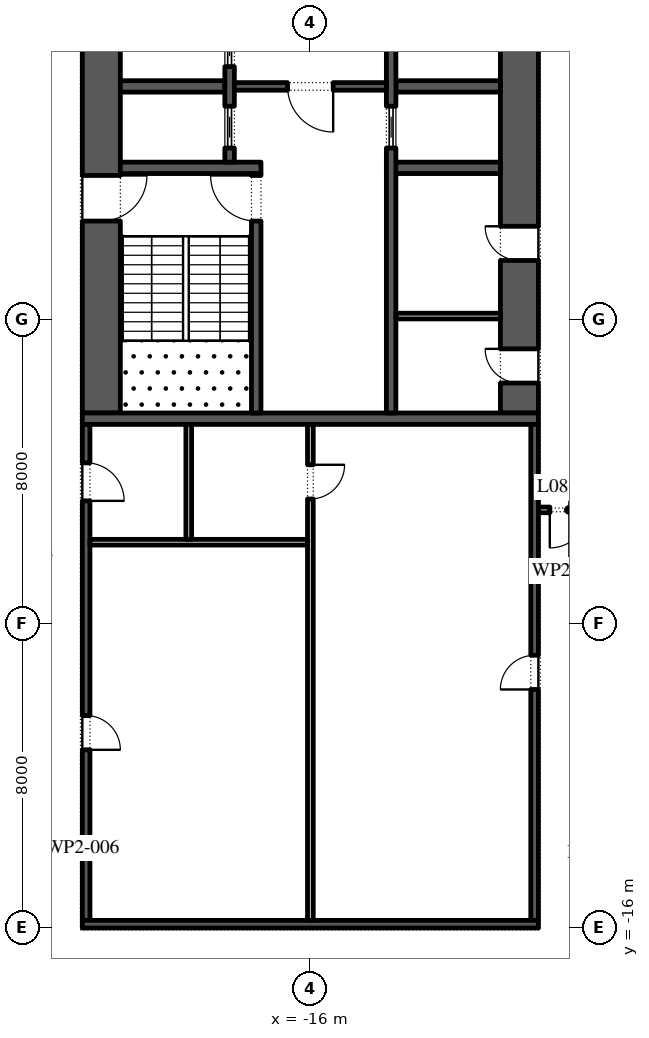
"""IFC4 building model, lengths in metres.
Left out: names, types, materials, properties, quantities, classifications, styles, units other than length and angle.
Written with IfcOpenShell. Run it as: python <this file> out.ifc"""

import sys

from ifc_helpers import new_model, si_unit, direction, frame, frame_2d, origin, place, context, subcontext, project, spatial, rectangle, extrude, element, fill, save


model = new_model("IFC4")
c1 = context("Model", 3, precision=1e-05, world=origin(), true_north=direction((0.0, 1.0)))
c2 = subcontext(c1, "Body", "Model", "MODEL_VIEW")
j1 = project(units=[si_unit("LENGTHUNIT", "METRE"), si_unit("PLANEANGLEUNIT", "RADIAN")], contexts=[c1])
p1 = place(None, origin())
s1 = spatial("IfcSite", under=j1, at=p1, CompositionType="ELEMENT")
p2 = place(p1, origin())
s2 = spatial("IfcBuilding", under=s1, at=p2, CompositionType="ELEMENT")
p3 = place(p2, frame((0.0, 0.0, 43.8)))
s3 = spatial("IfcBuildingStorey", under=s2, at=p3, CompositionType="ELEMENT", Elevation=43.8)
p4 = place(p3, frame((-21.5, -2.45, 0.0), z_axis=(0.0, 0.0, 1.0), x_axis=(0.0, 1.0, 0.0)))
e1 = element("IfcWall", 1, at=p4, inside=s3, PredefinedType="SHEAR", context=c2, shape_type="SweptSolid", body=[
    extrude(rectangle(XDim=27.9, YDim=1.0, at=frame_2d((13.95, 0.0))), origin(), (0.0, 0.0, 1.0), 4.0),
])
p5 = place(p4, frame((5.05, 0.0, 0.0)))
e2 = element("IfcOpeningElement", 2, at=p5, cuts=e1, PredefinedType="OPENING", context=c2, shape_type="SweptSolid", body=[
    extrude(rectangle(XDim=1.2, YDim=2.1, at=frame_2d((0.6, 1.05))), frame((0.0, 0.51, 0.0), z_axis=(0.0, -1.0, 0.0), x_axis=(1.0, 0.0, 0.0)), (0.0, 0.0, 1.0), 1.02),
])
p6 = place(p4, frame((21.65, 0.0, 0.0)))
e3 = element("IfcOpeningElement", 3, at=p6, cuts=e1, PredefinedType="OPENING", context=c2, shape_type="SweptSolid", body=[
    extrude(rectangle(XDim=1.2, YDim=2.1, at=frame_2d((0.6, 1.05))), frame((0.0, 0.51, 0.0), z_axis=(0.0, -1.0, 0.0), x_axis=(1.0, 0.0, 0.0)), (0.0, 0.0, 1.0), 1.02),
])
p7 = place(p3, frame((-10.5, -2.45, 0.0), z_axis=(0.0, 0.0, 1.0), x_axis=(0.0, 1.0, 0.0)))
e4 = element("IfcWall", 4, at=p7, inside=s3, PredefinedType="SHEAR", context=c2, shape_type="SweptSolid", body=[
    extrude(rectangle(XDim=27.9, YDim=1.0, at=frame_2d((13.95, 0.0))), origin(), (0.0, 0.0, 1.0), 4.0),
])
p8 = place(p7, frame((23.65, 0.0, 0.0)))
e5 = element("IfcOpeningElement", 5, at=p8, cuts=e4, PredefinedType="OPENING", context=c2, shape_type="SweptSolid", body=[
    extrude(rectangle(XDim=2.4, YDim=2.1, at=frame_2d((1.2, 1.05))), frame((0.0, 0.51, 0.0), z_axis=(0.0, -1.0, 0.0), x_axis=(1.0, 0.0, 0.0)), (0.0, 0.0, 1.0), 1.02),
])
p9 = place(p7, frame((0.788, 0.0, 0.0)))
e6 = element("IfcOpeningElement", 6, at=p9, cuts=e4, PredefinedType="OPENING", context=c2, shape_type="SweptSolid", body=[
    extrude(rectangle(XDim=0.9, YDim=2.1, at=frame_2d((0.45, 1.05))), frame((0.0, 0.51, 0.0), z_axis=(0.0, -1.0, 0.0), x_axis=(1.0, 0.0, 0.0)), (0.0, 0.0, 1.0), 1.02),
])
p10 = place(p7, frame((4.012, 0.0, 0.0)))
e7 = element("IfcOpeningElement", 7, at=p10, cuts=e4, PredefinedType="OPENING", context=c2, shape_type="SweptSolid", body=[
    extrude(rectangle(XDim=0.9, YDim=2.1, at=frame_2d((0.45, 1.05))), frame((0.0, 0.51, 0.0), z_axis=(0.0, -1.0, 0.0), x_axis=(1.0, 0.0, 0.0)), (0.0, 0.0, 1.0), 1.02),
])
p11 = place(p3, frame((-22.0, -2.6, 0.0), z_axis=(0.0, 0.0, 1.0), x_axis=(1.0, 0.0, 0.0)))
e8 = element("IfcWall", 8, at=p11, inside=s3, PredefinedType="SHEAR", context=c2, shape_type="SweptSolid", body=[
    extrude(rectangle(XDim=12.0, YDim=0.3, at=frame_2d((6.0, 0.0))), origin(), (0.0, 0.0, 1.0), 4.0),
])
p12 = place(p3, frame((-21.0, 4.0, 0.0), z_axis=(0.0, 0.0, 1.0), x_axis=(1.0, 0.0, 0.0)))
e9 = element("IfcWall", 9, at=p12, inside=s3, PredefinedType="SHEAR", context=c2, shape_type="SweptSolid", body=[
    extrude(rectangle(XDim=3.7, YDim=0.3, at=frame_2d((1.85, 0.0))), origin(), (0.0, 0.0, 1.0), 4.0),
])
p13 = place(p3, frame((-17.425, -2.45, 0.0), z_axis=(0.0, 0.0, 1.0), x_axis=(0.0, 1.0, 0.0)))
e10 = element("IfcWall", 10, at=p13, inside=s3, PredefinedType="SHEAR", context=c2, shape_type="SweptSolid", body=[
    extrude(rectangle(XDim=6.3, YDim=0.25, at=frame_2d((3.15, 0.0))), origin(), (0.0, 0.0, 1.0), 4.0),
])
p14 = place(p13, frame((5.05, 0.0, 0.0)))
e11 = element("IfcOpeningElement", 11, at=p14, cuts=e10, PredefinedType="OPENING", context=c2, shape_type="SweptSolid", body=[
    extrude(rectangle(XDim=1.2, YDim=2.1, at=frame_2d((0.6, 1.05))), frame((0.0, 0.135, 0.0), z_axis=(0.0, -1.0, 0.0), x_axis=(1.0, 0.0, 0.0)), (0.0, 0.0, 1.0), 0.27),
])
p15 = place(p3, frame((-21.0, 6.143, 0.0), z_axis=(0.0, 0.0, 1.0), x_axis=(1.0, 0.0, 0.0)))
e12 = element("IfcWall", 12, at=p15, inside=s3, PredefinedType="SHEAR", context=c2, shape_type="SweptSolid", body=[
    extrude(rectangle(XDim=2.75, YDim=0.3, at=frame_2d((1.375, 0.0))), origin(), (0.0, 0.0, 1.0), 4.0),
])
p16 = place(p3, frame((-18.125, 4.15, 0.0), z_axis=(0.0, 0.0, 1.0), x_axis=(0.0, 1.0, 0.0)))
e13 = element("IfcWall", 13, at=p16, inside=s3, PredefinedType="SHEAR", context=c2, shape_type="SweptSolid", body=[
    extrude(rectangle(XDim=14.7, YDim=0.25, at=frame_2d((7.35, 0.0))), origin(), (0.0, 0.0, 1.0), 4.0),
])
p17 = place(p16, frame((0.371, 0.0, 0.0)))
e14 = element("IfcOpeningElement", 14, at=p17, cuts=e13, PredefinedType="OPENING", context=c2, shape_type="SweptSolid", body=[
    extrude(rectangle(XDim=1.1, YDim=2.1, at=frame_2d((0.55, 1.05))), frame((0.0, 0.135, 0.0), z_axis=(0.0, -1.0, 0.0), x_axis=(1.0, 0.0, 0.0)), (0.0, 0.0, 1.0), 0.27),
])
p18 = place(p16, frame((2.514, 0.0, 0.0)))
e15 = element("IfcOpeningElement", 15, at=p18, cuts=e13, PredefinedType="OPENING", context=c2, shape_type="SweptSolid", body=[
    extrude(rectangle(XDim=1.1, YDim=2.1, at=frame_2d((0.55, 1.05))), frame((0.0, 0.135, 0.0), z_axis=(0.0, -1.0, 0.0), x_axis=(1.0, 0.0, 0.0)), (0.0, 0.0, 1.0), 0.27),
])
p19 = place(p16, frame((4.657, 0.0, 0.0)))
e16 = element("IfcOpeningElement", 16, at=p19, cuts=e13, PredefinedType="OPENING", context=c2, shape_type="SweptSolid", body=[
    extrude(rectangle(XDim=1.1, YDim=2.1, at=frame_2d((0.55, 1.05))), frame((0.0, 0.135, 0.0), z_axis=(0.0, -1.0, 0.0), x_axis=(1.0, 0.0, 0.0)), (0.0, 0.0, 1.0), 0.27),
])
p20 = place(p16, frame((6.8, 0.0, 0.0)))
e17 = element("IfcOpeningElement", 17, at=p20, cuts=e13, PredefinedType="OPENING", context=c2, shape_type="SweptSolid", body=[
    extrude(rectangle(XDim=1.1, YDim=2.1, at=frame_2d((0.55, 1.05))), frame((0.0, 0.135, 0.0), z_axis=(0.0, -1.0, 0.0), x_axis=(1.0, 0.0, 0.0)), (0.0, 0.0, 1.0), 0.27),
])
p21 = place(p16, frame((8.943, 0.0, 0.0)))
e18 = element("IfcOpeningElement", 18, at=p21, cuts=e13, PredefinedType="OPENING", context=c2, shape_type="SweptSolid", body=[
    extrude(rectangle(XDim=1.1, YDim=2.1, at=frame_2d((0.55, 1.05))), frame((0.0, 0.135, 0.0), z_axis=(0.0, -1.0, 0.0), x_axis=(1.0, 0.0, 0.0)), (0.0, 0.0, 1.0), 0.27),
])
p22 = place(p16, frame((11.086, 0.0, 0.0)))
e19 = element("IfcOpeningElement", 19, at=p22, cuts=e13, PredefinedType="OPENING", context=c2, shape_type="SweptSolid", body=[
    extrude(rectangle(XDim=1.1, YDim=2.1, at=frame_2d((0.55, 1.05))), frame((0.0, 0.135, 0.0), z_axis=(0.0, -1.0, 0.0), x_axis=(1.0, 0.0, 0.0)), (0.0, 0.0, 1.0), 0.27),
])
p23 = place(p16, frame((13.229, 0.0, 0.0)))
e20 = element("IfcOpeningElement", 20, at=p23, cuts=e13, PredefinedType="OPENING", context=c2, shape_type="SweptSolid", body=[
    extrude(rectangle(XDim=1.1, YDim=2.1, at=frame_2d((0.55, 1.05))), frame((0.0, 0.135, 0.0), z_axis=(0.0, -1.0, 0.0), x_axis=(1.0, 0.0, 0.0)), (0.0, 0.0, 1.0), 0.27),
])
p24 = place(p3, frame((-14.0, 4.0, 0.0), z_axis=(0.0, 0.0, 1.0), x_axis=(1.0, 0.0, 0.0)))
e21 = element("IfcWall", 21, at=p24, inside=s3, PredefinedType="SHEAR", context=c2, shape_type="SweptSolid", body=[
    extrude(rectangle(XDim=3.0, YDim=0.3, at=frame_2d((1.5, 0.0))), origin(), (0.0, 0.0, 1.0), 4.0),
])
p25 = place(p3, frame((-13.75, 6.143, 0.0), z_axis=(0.0, 0.0, 1.0), x_axis=(1.0, 0.0, 0.0)))
e22 = element("IfcWall", 22, at=p25, inside=s3, PredefinedType="SHEAR", context=c2, shape_type="SweptSolid", body=[
    extrude(rectangle(XDim=2.75, YDim=0.3, at=frame_2d((1.375, 0.0))), origin(), (0.0, 0.0, 1.0), 4.0),
])
p26 = place(p3, frame((-13.875, -2.45, 0.0), z_axis=(0.0, 0.0, 1.0), x_axis=(0.0, 1.0, 0.0)))
e23 = element("IfcWall", 23, at=p26, inside=s3, PredefinedType="SHEAR", context=c2, shape_type="SweptSolid", body=[
    extrude(rectangle(XDim=21.3, YDim=0.25, at=frame_2d((10.65, 0.0))), origin(), (0.0, 0.0, 1.0), 4.0),
])
p27 = place(p26, frame((10.396, 0.0, 0.0)))
e24 = element("IfcOpeningElement", 24, at=p27, cuts=e23, PredefinedType="OPENING", context=c2, shape_type="SweptSolid", body=[
    extrude(rectangle(XDim=0.9, YDim=2.1, at=frame_2d((0.45, 1.05))), frame((0.0, 0.135, 0.0), z_axis=(0.0, -1.0, 0.0), x_axis=(1.0, 0.0, 0.0)), (0.0, 0.0, 1.0), 0.27),
])
p28 = place(p26, frame((14.6, 0.0, 0.0)))
e25 = element("IfcOpeningElement", 25, at=p28, cuts=e23, PredefinedType="OPENING", context=c2, shape_type="SweptSolid", body=[
    extrude(rectangle(XDim=0.9, YDim=2.1, at=frame_2d((0.45, 1.05))), frame((0.0, 0.135, 0.0), z_axis=(0.0, -1.0, 0.0), x_axis=(1.0, 0.0, 0.0)), (0.0, 0.0, 1.0), 0.27),
])
p29 = place(p26, frame((18.775, 0.0, 0.0)))
e26 = element("IfcOpeningElement", 26, at=p29, cuts=e23, PredefinedType="OPENING", context=c2, shape_type="SweptSolid", body=[
    extrude(rectangle(XDim=0.9, YDim=2.1, at=frame_2d((0.45, 1.05))), frame((0.0, 0.135, 0.0), z_axis=(0.0, -1.0, 0.0), x_axis=(1.0, 0.0, 0.0)), (0.0, 0.0, 1.0), 0.27),
])
p30 = place(p26, frame((6.971, 0.0, 0.0)))
e27 = element("IfcOpeningElement", 27, at=p30, cuts=e23, PredefinedType="OPENING", context=c2, shape_type="SweptSolid", body=[
    extrude(rectangle(XDim=1.1, YDim=2.1, at=frame_2d((0.55, 1.05))), frame((0.0, 0.135, 0.0), z_axis=(0.0, -1.0, 0.0), x_axis=(1.0, 0.0, 0.0)), (0.0, 0.0, 1.0), 0.27),
])
p31 = place(p3, frame((-18.0, 6.143, 0.0), z_axis=(0.0, 0.0, 1.0), x_axis=(1.0, 0.0, 0.0)))
e28 = element("IfcWall", 28, at=p31, inside=s3, PredefinedType="SHEAR", context=c2, shape_type="SweptSolid", body=[
    extrude(rectangle(XDim=4.0, YDim=0.2, at=frame_2d((2.0, 0.0))), origin(), (0.0, 0.0, 1.0), 4.0),
])
p32 = place(p31, frame((1.4, 0.0, 0.0)))
e29 = element("IfcOpeningElement", 29, at=p32, cuts=e28, PredefinedType="OPENING", context=c2, shape_type="SweptSolid", body=[
    extrude(rectangle(XDim=1.2, YDim=2.1, at=frame_2d((0.6, 1.05))), frame((0.0, 0.11, 0.0), z_axis=(0.0, -1.0, 0.0), x_axis=(1.0, 0.0, 0.0)), (0.0, 0.0, 1.0), 0.22),
])
p33 = place(p3, frame((-13.75, 0.1, 0.0), z_axis=(0.0, 0.0, 1.0), x_axis=(1.0, 0.0, 0.0)))
e30 = element("IfcWall", 30, at=p33, inside=s3, PredefinedType="PARTITIONING", context=c2, shape_type="SweptSolid", body=[
    extrude(rectangle(XDim=2.75, YDim=0.15, at=frame_2d((1.375, 0.0))), origin(), (0.0, 0.0, 1.0), 4.0),
])
p34 = place(p3, frame((-21.9, -15.8, 0.0), z_axis=(0.0, 0.0, 1.0), x_axis=(0.0, 1.0, 0.0)))
e31 = element("IfcWall", 31, at=p34, inside=s3, PredefinedType="SHEAR", context=c2, shape_type="SweptSolid", body=[
    extrude(rectangle(XDim=13.05, YDim=0.2, at=frame_2d((6.525, 0.0))), origin(), (0.0, 0.0, 1.0), 4.0),
])
p35 = place(p34, frame((4.488, 0.0, 0.0)))
e32 = element("IfcOpeningElement", 32, at=p35, cuts=e31, PredefinedType="OPENING", context=c2, shape_type="SweptSolid", body=[
    extrude(rectangle(XDim=0.9, YDim=2.1, at=frame_2d((0.45, 1.05))), frame((0.0, 0.11, 0.0), z_axis=(0.0, -1.0, 0.0), x_axis=(1.0, 0.0, 0.0)), (0.0, 0.0, 1.0), 0.22),
])
p36 = place(p34, frame((11.038, 0.0, 0.0)))
e33 = element("IfcOpeningElement", 33, at=p36, cuts=e31, PredefinedType="OPENING", context=c2, shape_type="SweptSolid", body=[
    extrude(rectangle(XDim=1.0, YDim=2.1, at=frame_2d((0.5, 1.05))), frame((0.0, 0.11, 0.0), z_axis=(0.0, -1.0, 0.0), x_axis=(1.0, 0.0, 0.0)), (0.0, 0.0, 1.0), 0.22),
])
p37 = place(p3, frame((-10.1, -15.8, 0.0), z_axis=(0.0, 0.0, 1.0), x_axis=(0.0, 1.0, 0.0)))
e34 = element("IfcWall", 34, at=p37, inside=s3, PredefinedType="SHEAR", context=c2, shape_type="SweptSolid", body=[
    extrude(rectangle(XDim=13.05, YDim=0.2, at=frame_2d((6.525, 0.0))), origin(), (0.0, 0.0, 1.0), 4.0),
])
p38 = place(p37, frame((6.075, 0.0, 0.0)))
e35 = element("IfcOpeningElement", 35, at=p38, cuts=e34, PredefinedType="OPENING", context=c2, shape_type="SweptSolid", body=[
    extrude(rectangle(XDim=0.9, YDim=2.1, at=frame_2d((0.45, 1.05))), frame((0.0, 0.11, 0.0), z_axis=(0.0, -1.0, 0.0), x_axis=(1.0, 0.0, 0.0)), (0.0, 0.0, 1.0), 0.22),
])
p39 = place(p3, frame((-22.0, -15.9, 0.0), z_axis=(0.0, 0.0, 1.0), x_axis=(1.0, 0.0, 0.0)))
e36 = element("IfcWall", 36, at=p39, inside=s3, PredefinedType="SHEAR", context=c2, shape_type="SweptSolid", body=[
    extrude(rectangle(XDim=12.0, YDim=0.2, at=frame_2d((6.0, 0.0))), origin(), (0.0, 0.0, 1.0), 4.0),
])
p40 = place(p3, frame((-16.0, -15.8, 0.0), z_axis=(0.0, 0.0, 1.0), x_axis=(0.0, 1.0, 0.0)))
e37 = element("IfcWall", 37, at=p40, inside=s3, PredefinedType="PARTITIONING", context=c2, shape_type="SweptSolid", body=[
    extrude(rectangle(XDim=13.05, YDim=0.15, at=frame_2d((6.525, 0.0))), origin(), (0.0, 0.0, 1.0), 4.0),
])
p41 = place(p40, frame((11.087, 0.0, 0.0)))
e38 = element("IfcOpeningElement", 38, at=p41, cuts=e37, PredefinedType="OPENING", context=c2, shape_type="SweptSolid", body=[
    extrude(rectangle(XDim=0.9, YDim=2.1, at=frame_2d((0.45, 1.05))), frame((0.0, 0.085, 0.0), z_axis=(0.0, -1.0, 0.0), x_axis=(1.0, 0.0, 0.0)), (0.0, 0.0, 1.0), 0.17),
])
p42 = place(p3, frame((-21.8, -5.85, 0.0), z_axis=(0.0, 0.0, 1.0), x_axis=(1.0, 0.0, 0.0)))
e39 = element("IfcWall", 39, at=p42, inside=s3, PredefinedType="PARTITIONING", context=c2, shape_type="SweptSolid", body=[
    extrude(rectangle(XDim=5.725, YDim=0.15, at=frame_2d((2.863, 0.0))), origin(), (0.0, 0.0, 1.0), 4.0),
])
p43 = place(p3, frame((-19.2, -5.775, 0.0), z_axis=(0.0, 0.0, 1.0), x_axis=(0.0, 1.0, 0.0)))
e40 = element("IfcWall", 40, at=p43, inside=s3, PredefinedType="PARTITIONING", context=c2, shape_type="SweptSolid", body=[
    extrude(rectangle(XDim=3.025, YDim=0.15, at=frame_2d((1.512, 0.0))), origin(), (0.0, 0.0, 1.0), 4.0),
])
p44 = place(p3, frame((-8.4, -5.0, 0.0), z_axis=(0.0, 0.0, 1.0), x_axis=(-1.0, 0.0, 0.0)))
e41 = element("IfcWall", 41, at=p44, inside=s3, PredefinedType="PARTITIONING", context=c2, shape_type="SweptSolid", body=[
    extrude(rectangle(XDim=1.6, YDim=0.15, at=frame_2d((0.8, 0.0))), origin(), (0.0, 0.0, 1.0), 4.0),
])
p45 = place(p44, frame((0.3, 0.0, 0.0)))
e42 = element("IfcOpeningElement", 42, at=p45, cuts=e41, PredefinedType="OPENING", context=c2, shape_type="SweptSolid", body=[
    extrude(rectangle(XDim=1.0, YDim=2.1, at=frame_2d((0.5, 1.05))), frame((0.0, 0.085, 0.0), z_axis=(0.0, -1.0, 0.0), x_axis=(1.0, 0.0, 0.0)), (0.0, 0.0, 1.0), 0.17),
])
p46 = place(p17, origin())
e43 = element("IfcDoor", 43, at=p46, inside=s3, OperationType="SLIDING_TO_LEFT", PredefinedType="DOOR", context=c2, shape_type="SweptSolid", body=[
    extrude(rectangle(XDim=1.1, YDim=2.1, at=frame_2d((0.55, 1.05))), frame((0.0, 0.025, 0.0), z_axis=(0.0, -1.0, 0.0), x_axis=(1.0, 0.0, 0.0)), (0.0, 0.0, 1.0), 0.05),
])
fill(e14, e43)
p47 = place(p18, origin())
e44 = element("IfcDoor", 44, at=p47, inside=s3, OperationType="SLIDING_TO_LEFT", PredefinedType="DOOR", context=c2, shape_type="SweptSolid", body=[
    extrude(rectangle(XDim=1.1, YDim=2.1, at=frame_2d((0.55, 1.05))), frame((0.0, 0.025, 0.0), z_axis=(0.0, -1.0, 0.0), x_axis=(1.0, 0.0, 0.0)), (0.0, 0.0, 1.0), 0.05),
])
fill(e15, e44)
p48 = place(p30, origin())
e45 = element("IfcDoor", 45, at=p48, inside=s3, OperationType="SLIDING_TO_LEFT", PredefinedType="DOOR", context=c2, shape_type="SweptSolid", body=[
    extrude(rectangle(XDim=1.1, YDim=2.1, at=frame_2d((0.55, 1.05))), frame((0.0, 0.025, 0.0), z_axis=(0.0, -1.0, 0.0), x_axis=(1.0, 0.0, 0.0)), (0.0, 0.0, 1.0), 0.05),
])
fill(e27, e45)
p49 = place(p32, frame((1.2, 0.0, 0.0), z_axis=(0.0, 0.0, 1.0), x_axis=(-1.0, 0.0, 0.0)))
e46 = element("IfcDoor", 46, at=p49, inside=s3, OperationType="SINGLE_SWING_RIGHT", PredefinedType="DOOR", context=c2, shape_type="SweptSolid", body=[
    extrude(rectangle(XDim=1.2, YDim=2.1, at=frame_2d((0.6, 1.05))), frame((0.0, 0.025, 0.0), z_axis=(0.0, -1.0, 0.0), x_axis=(1.0, 0.0, 0.0)), (0.0, 0.0, 1.0), 0.05),
])
fill(e29, e46)
p50 = place(p14, origin())
e47 = element("IfcDoor", 47, at=p50, inside=s3, OperationType="SINGLE_SWING_LEFT", PredefinedType="DOOR", context=c2, shape_type="SweptSolid", body=[
    extrude(rectangle(XDim=1.2, YDim=2.1, at=frame_2d((0.6, 1.05))), frame((0.0, 0.025, 0.0), z_axis=(0.0, -1.0, 0.0), x_axis=(1.0, 0.0, 0.0)), (0.0, 0.0, 1.0), 0.05),
])
fill(e11, e47)
p51 = place(p5, frame((1.2, 0.0, 0.0), z_axis=(0.0, 0.0, 1.0), x_axis=(-1.0, 0.0, 0.0)))
e48 = element("IfcDoor", 48, at=p51, inside=s3, OperationType="SINGLE_SWING_RIGHT", PredefinedType="DOOR", context=c2, shape_type="SweptSolid", body=[
    extrude(rectangle(XDim=1.2, YDim=2.1, at=frame_2d((0.6, 1.05))), frame((0.0, 0.025, 0.0), z_axis=(0.0, -1.0, 0.0), x_axis=(1.0, 0.0, 0.0)), (0.0, 0.0, 1.0), 0.05),
])
fill(e2, e48)
p52 = place(p9, origin())
e49 = element("IfcDoor", 49, at=p52, inside=s3, OperationType="SINGLE_SWING_LEFT", PredefinedType="DOOR", context=c2, shape_type="SweptSolid", body=[
    extrude(rectangle(XDim=0.9, YDim=2.1, at=frame_2d((0.45, 1.05))), frame((0.0, 0.5, 0.0), z_axis=(0.0, -1.0, 0.0), x_axis=(1.0, 0.0, 0.0)), (0.0, 0.0, 1.0), 0.05),
])
fill(e6, e49)
p53 = place(p10, origin())
e50 = element("IfcDoor", 50, at=p53, inside=s3, OperationType="SINGLE_SWING_LEFT", PredefinedType="DOOR", context=c2, shape_type="SweptSolid", body=[
    extrude(rectangle(XDim=0.9, YDim=2.1, at=frame_2d((0.45, 1.05))), frame((0.0, 0.5, 0.0), z_axis=(0.0, -1.0, 0.0), x_axis=(1.0, 0.0, 0.0)), (0.0, 0.0, 1.0), 0.05),
])
fill(e7, e50)
p54 = place(p35, frame((0.9, -0.15, 0.0), z_axis=(0.0, 0.0, 1.0), x_axis=(-1.0, 0.0, 0.0)))
e51 = element("IfcDoor", 51, at=p54, inside=s3, OperationType="SINGLE_SWING_LEFT", PredefinedType="DOOR", context=c2, shape_type="SweptSolid", body=[
    extrude(rectangle(XDim=0.9, YDim=2.1, at=frame_2d((0.45, 1.05))), frame((0.0, -0.05, 0.0), z_axis=(0.0, -1.0, 0.0), x_axis=(1.0, 0.0, 0.0)), (0.0, 0.0, 1.0), 0.05),
])
fill(e32, e51)
p55 = place(p36, frame((1.0, -0.15, 0.0), z_axis=(0.0, 0.0, 1.0), x_axis=(-1.0, 0.0, 0.0)))
e52 = element("IfcDoor", 52, at=p55, inside=s3, OperationType="SINGLE_SWING_LEFT", PredefinedType="DOOR", context=c2, shape_type="SweptSolid", body=[
    extrude(rectangle(XDim=1.0, YDim=2.1, at=frame_2d((0.5, 1.05))), frame((0.0, -0.05, 0.0), z_axis=(0.0, -1.0, 0.0), x_axis=(1.0, 0.0, 0.0)), (0.0, 0.0, 1.0), 0.05),
])
fill(e33, e52)
p56 = place(p41, frame((0.9, 0.0, 0.0), z_axis=(0.0, 0.0, 1.0), x_axis=(-1.0, 0.0, 0.0)))
e53 = element("IfcDoor", 53, at=p56, inside=s3, OperationType="SINGLE_SWING_RIGHT", PredefinedType="DOOR", context=c2, shape_type="SweptSolid", body=[
    extrude(rectangle(XDim=0.9, YDim=2.1, at=frame_2d((0.45, 1.05))), frame((0.0, 0.025, 0.0), z_axis=(0.0, -1.0, 0.0), x_axis=(1.0, 0.0, 0.0)), (0.0, 0.0, 1.0), 0.05),
])
fill(e38, e53)
p57 = place(p38, origin())
e54 = element("IfcDoor", 54, at=p57, inside=s3, OperationType="SINGLE_SWING_RIGHT", PredefinedType="DOOR", context=c2, shape_type="SweptSolid", body=[
    extrude(rectangle(XDim=0.9, YDim=2.1, at=frame_2d((0.45, 1.05))), frame((0.0, 0.1, 0.0), z_axis=(0.0, -1.0, 0.0), x_axis=(1.0, 0.0, 0.0)), (0.0, 0.0, 1.0), 0.05),
])
fill(e35, e54)
p58 = place(p45, origin())
e55 = element("IfcDoor", 55, at=p58, inside=s3, OperationType="SINGLE_SWING_LEFT", PredefinedType="DOOR", context=c2, shape_type="SweptSolid", body=[
    extrude(rectangle(XDim=1.0, YDim=2.1, at=frame_2d((0.5, 1.05))), frame((0.0, 0.025, 0.0), z_axis=(0.0, -1.0, 0.0), x_axis=(1.0, 0.0, 0.0)), (0.0, 0.0, 1.0), 0.05),
])
fill(e42, e55)
save(model, sys.argv[1])
